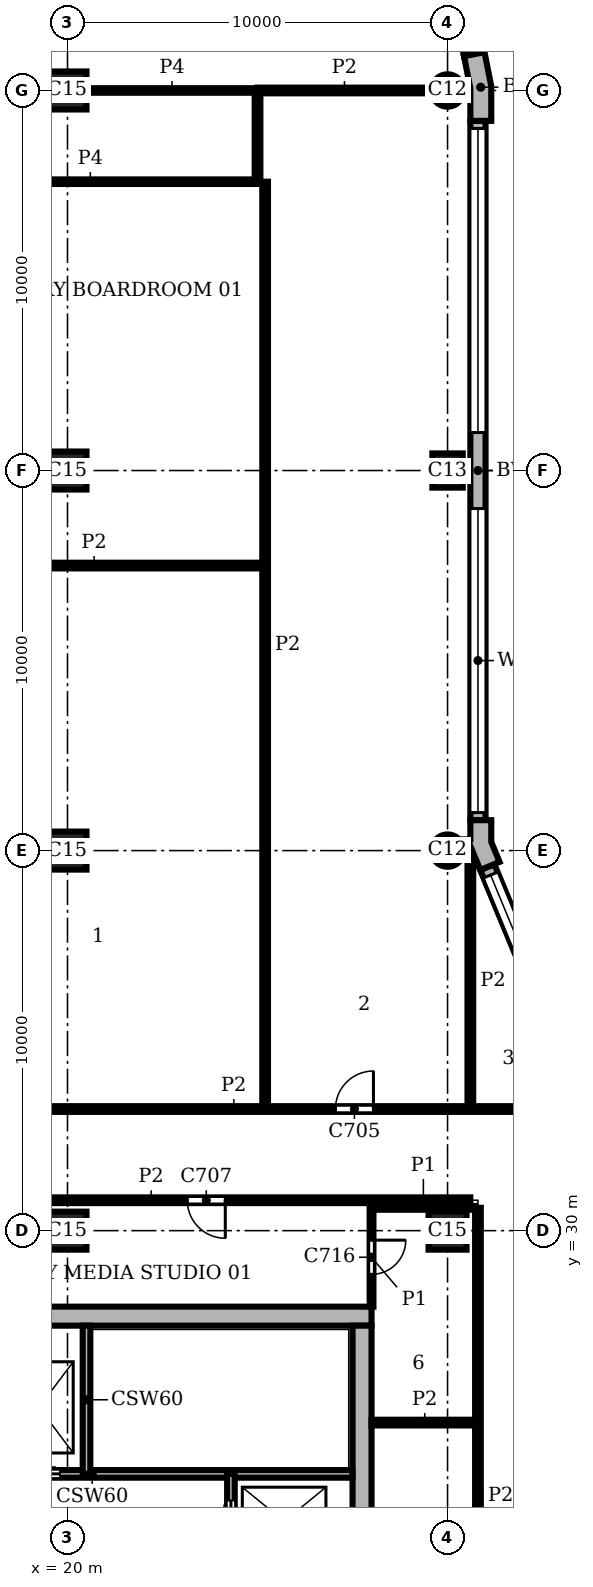
"""IFC4 building model, lengths in metres.
Left out: names, types, materials, properties, quantities, classifications, styles, units other than length and angle.
Written with IfcOpenShell. Run it as: python <this file> out.ifc"""

import sys

from ifc_helpers import new_model, si_unit, direction, frame, frame_2d, origin, origin_2d, place, context, subcontext, project, spatial, polyline, rectangle, circle, outline, extrude, element, fill, save


model = new_model("IFC4")
c1 = context("Model", 3, precision=1e-05, world=origin(), true_north=direction((0.0, 1.0)))
c2 = subcontext(c1, "Body", "Model", "MODEL_VIEW")
j1 = project(units=[si_unit("LENGTHUNIT", "METRE"), si_unit("PLANEANGLEUNIT", "RADIAN")], contexts=[c1])
p1 = place(None, origin())
s1 = spatial("IfcSite", under=j1, at=p1, CompositionType="ELEMENT")
p2 = place(p1, origin())
s2 = spatial("IfcBuilding", under=s1, at=p2, CompositionType="ELEMENT")
p3 = place(p2, frame((0.0, 0.0, 309.9)))
s3 = spatial("IfcBuildingStorey", under=s2, at=p3, CompositionType="ELEMENT", Elevation=309.9)
p4 = place(p3, frame((30.0, 40.0, 0.0), z_axis=(0.0, 0.0, 1.0), x_axis=(1.0, 0.0, 0.0)))
e1 = element("IfcColumn", 1, at=p4, inside=s3, PredefinedType="COLUMN", context=c2, shape_type="SweptSolid", body=[
    extrude(circle(Radius=0.425, at=origin_2d()), origin(), (0.0, 0.0, 1.0), 3.9),
])
p5 = place(p3, frame((30.0, 50.0, 0.0), z_axis=(0.0, 0.0, 1.0), x_axis=(0.0, 1.0, 0.0)))
e2 = element("IfcColumn", 2, at=p5, inside=s3, PredefinedType="COLUMN", context=c2, shape_type="SweptSolid", body=[
    extrude(rectangle(XDim=0.9, YDim=0.8, at=origin_2d()), origin(), (0.0, 0.0, 1.0), 3.9),
])
p6 = place(p3, frame((30.0, 60.0, 0.0), z_axis=(0.0, 0.0, 1.0), x_axis=(1.0, 0.0, 0.0)))
e3 = element("IfcColumn", 3, at=p6, inside=s3, PredefinedType="COLUMN", context=c2, shape_type="SweptSolid", body=[
    extrude(circle(Radius=0.425, at=origin_2d()), origin(), (0.0, 0.0, 1.0), 3.9),
])
for number, where, z_axis, x_axis in (
    (4, (20.0, 30.0, 0.0), (0.0, 0.0, 1.0), (1.0, 0.0, 0.0)),
    (5, (20.0, 40.0, 0.0), (0.0, 0.0, 1.0), (1.0, 0.0, 0.0)),
    (6, (20.0, 50.0, 0.0), (0.0, 0.0, 1.0), (1.0, 0.0, 0.0)),
    (7, (20.0, 60.0, 0.0), (0.0, 0.0, 1.0), (1.0, 0.0, 0.0)),
    (8, (30.0, 30.0, 0.0), (0.0, 0.0, 1.0), (1.0, 0.0, 0.0)),
):
    element("IfcColumn", number, at=place(p3, frame(where, z_axis=z_axis, x_axis=x_axis)), inside=s3, PredefinedType="COLUMN", context=c2, shape_type="SweptSolid", body=[
        extrude(rectangle(XDim=1.0, YDim=1.0, at=origin_2d()), origin(), (0.0, 0.0, 1.0), 3.9),
    ])
p7 = place(p3, frame((27.75, 8.5, 0.0), z_axis=(0.0, 0.0, 1.0), x_axis=(0.0, 1.0, 0.0)))
e9 = element("IfcWall", 9, at=p7, inside=s3, PredefinedType="SHEAR", context=c2, shape_type="SweptSolid", body=[
    extrude(rectangle(XDim=19.0, YDim=0.5, at=frame_2d((9.5, 0.0))), origin(), (0.0, 0.0, 1.0), 3.9),
])
p8 = place(p7, frame((4.95, 0.0, 0.0)))
e10 = element("IfcOpeningElement", 10, at=p8, cuts=e9, PredefinedType="OPENING", context=c2, shape_type="SweptSolid", body=[
    extrude(rectangle(XDim=1.6, YDim=2.1, at=frame_2d((0.8, 1.05))), frame((0.0, 0.26, 0.0), z_axis=(0.0, -1.0, 0.0), x_axis=(1.0, 0.0, 0.0)), (0.0, 0.0, 1.0), 0.52),
])
p9 = place(p3, frame((28.0, 27.75, 0.0), z_axis=(0.0, 0.0, 1.0), x_axis=(-1.0, 0.0, 0.0)))
e11 = element("IfcWall", 11, at=p9, inside=s3, PredefinedType="SHEAR", context=c2, shape_type="SweptSolid", body=[
    extrude(rectangle(XDim=20.0, YDim=0.5, at=frame_2d((10.0, 0.0))), origin(), (0.0, 0.0, 1.0), 3.9),
])
p10 = place(p3, origin())
e12 = element("IfcWall", 12, at=p10, inside=s3, PredefinedType="SOLIDWALL", context=c2, shape_type="SweptSolid", body=[
    extrude(outline(polyline([(30.62, 39.995), (30.62, 40.071), (30.861, 39.49), (31.23, 39.644), (31.369, 39.701), (31.15, 40.229), (31.15, 40.8), (31.0, 40.8), (30.6, 40.8), (30.6, 40.295), (30.425, 40.295), (30.425, 39.995), (30.62, 39.995)])), origin(), (0.0, 0.0, 1.0), 3.9),
])
e13 = element("IfcWall", 13, at=p10, inside=s3, PredefinedType="SOLIDWALL", context=c2, shape_type="SweptSolid", body=[
    extrude(outline(polyline([(31.0, 59.2), (31.15, 59.2), (31.15, 60.113), (30.972, 61.009), (30.825, 60.98), (30.432, 60.902), (30.6, 60.059), (30.6, 59.2), (31.0, 59.2)])), origin(), (0.0, 0.0, 1.0), 3.9),
])
p11 = place(p3, frame((33.362, 33.974, 0.0), z_axis=(0.0, 0.0, 1.0), x_axis=(-0.382655745237, 0.923891000409, 0.0)))
e14 = element("IfcWall", 14, at=p11, inside=s3, PredefinedType="SOLIDWALL", context=c2, shape_type="SweptSolid", body=[
    extrude(rectangle(XDim=6.053, YDim=0.4, at=frame_2d((3.027, 0.0))), origin(), (0.0, 0.0, 1.0), 3.9),
])
p12 = place(p11, frame((0.227, 0.0, 0.9)))
e15 = element("IfcOpeningElement", 15, at=p12, cuts=e14, PredefinedType="OPENING", context=c2, shape_type="SweptSolid", body=[
    extrude(rectangle(XDim=5.6, YDim=2.35, at=frame_2d((2.8, 1.175))), frame((0.0, 0.21, 0.0), z_axis=(0.0, -1.0, 0.0), x_axis=(1.0, 0.0, 0.0)), (0.0, 0.0, 1.0), 0.42),
])
p13 = place(p3, frame((30.8, 40.8, 0.0), z_axis=(0.0, 0.0, 1.0), x_axis=(0.0, 1.0, 0.0)))
e16 = element("IfcWall", 16, at=p13, inside=s3, PredefinedType="SOLIDWALL", context=c2, shape_type="SweptSolid", body=[
    extrude(rectangle(XDim=18.4, YDim=0.4, at=frame_2d((9.2, 0.0))), origin(), (0.0, 0.0, 1.0), 3.9),
])
p14 = place(p13, frame((0.2, 0.0, 0.9)))
e17 = element("IfcOpeningElement", 17, at=p14, cuts=e16, PredefinedType="OPENING", context=c2, shape_type="SweptSolid", body=[
    extrude(rectangle(XDim=8.0, YDim=2.35, at=frame_2d((4.0, 1.175))), frame((0.0, 0.21, 0.0), z_axis=(0.0, -1.0, 0.0), x_axis=(1.0, 0.0, 0.0)), (0.0, 0.0, 1.0), 0.42),
])
p15 = place(p13, frame((10.2, 0.0, 0.9)))
e18 = element("IfcOpeningElement", 18, at=p15, cuts=e16, PredefinedType="OPENING", context=c2, shape_type="SweptSolid", body=[
    extrude(rectangle(XDim=8.0, YDim=2.35, at=frame_2d((4.0, 1.175))), frame((0.0, 0.21, 0.0), z_axis=(0.0, -1.0, 0.0), x_axis=(1.0, 0.0, 0.0)), (0.0, 0.0, 1.0), 0.42),
])
p16 = place(p3, frame((30.629, 60.941, 0.0), z_axis=(0.0, 0.0, 1.0), x_axis=(-0.195098533057, 0.98078364709, 0.0)))
e19 = element("IfcWall", 19, at=p16, inside=s3, PredefinedType="SOLIDWALL", context=c2, shape_type="SweptSolid", body=[
    extrude(rectangle(XDim=4.753, YDim=0.4, at=frame_2d((2.376, 0.0))), origin(), (0.0, 0.0, 1.0), 3.9),
])
p17 = place(p16, frame((0.226, 0.0, 0.9)))
e20 = element("IfcOpeningElement", 20, at=p17, cuts=e19, PredefinedType="OPENING", context=c2, shape_type="SweptSolid", body=[
    extrude(rectangle(XDim=4.3, YDim=2.35, at=frame_2d((2.15, 1.175))), frame((0.0, 0.21, 0.0), z_axis=(0.0, -1.0, 0.0), x_axis=(1.0, 0.0, 0.0)), (0.0, 0.0, 1.0), 0.42),
])
p18 = place(p3, frame((13.8, 23.6, 0.0), z_axis=(0.0, 0.0, 1.0), x_axis=(1.0, 0.0, 0.0)))
e21 = element("IfcWall", 21, at=p18, inside=s3, PredefinedType="SHEAR", context=c2, shape_type="SweptSolid", body=[
    extrude(rectangle(XDim=13.7, YDim=0.2, at=frame_2d((6.85, 0.0))), origin(), (0.0, 0.0, 1.0), 3.58),
])
p19 = place(p18, frame((2.4, 0.0, 0.0)))
e22 = element("IfcOpeningElement", 22, at=p19, cuts=e21, PredefinedType="OPENING", context=c2, shape_type="SweptSolid", body=[
    extrude(rectangle(XDim=1.1, YDim=2.1, at=frame_2d((0.55, 1.05))), frame((0.0, 0.11, 0.0), z_axis=(0.0, -1.0, 0.0), x_axis=(1.0, 0.0, 0.0)), (0.0, 0.0, 1.0), 0.22),
])
p20 = place(p18, frame((4.9, 0.0, 0.0)))
e23 = element("IfcOpeningElement", 23, at=p20, cuts=e21, PredefinedType="OPENING", context=c2, shape_type="SweptSolid", body=[
    extrude(rectangle(XDim=1.1, YDim=2.1, at=frame_2d((0.55, 1.05))), frame((0.0, 0.11, 0.0), z_axis=(0.0, -1.0, 0.0), x_axis=(1.0, 0.0, 0.0)), (0.0, 0.0, 1.0), 0.22),
])
p21 = place(p18, frame((0.15, 0.0, 0.0)))
e24 = element("IfcOpeningElement", 24, at=p21, cuts=e21, PredefinedType="OPENING", context=c2, shape_type="SweptSolid", body=[
    extrude(rectangle(XDim=1.0, YDim=2.1, at=frame_2d((0.5, 1.05))), frame((0.0, 0.11, 0.0), z_axis=(0.0, -1.0, 0.0), x_axis=(1.0, 0.0, 0.0)), (0.0, 0.0, 1.0), 0.22),
])
p22 = place(p3, frame((20.5, 23.6, 0.0), z_axis=(0.0, 0.0, 1.0), x_axis=(0.0, 1.0, 0.0)))
e25 = element("IfcWall", 25, at=p22, inside=s3, PredefinedType="SHEAR", context=c2, shape_type="SweptSolid", body=[
    extrude(rectangle(XDim=3.9, YDim=0.2, at=frame_2d((1.95, 0.0))), origin(), (0.0, 0.0, 1.0), 3.58),
])
p23 = place(p3, frame((24.3, 16.1, 0.0), z_axis=(0.0, 0.0, 1.0), x_axis=(0.0, 1.0, 0.0)))
e26 = element("IfcWall", 26, at=p23, inside=s3, PredefinedType="SHEAR", context=c2, shape_type="SweptSolid", body=[
    extrude(rectangle(XDim=7.5, YDim=0.2, at=frame_2d((3.75, 0.0))), origin(), (0.0, 0.0, 1.0), 3.58),
])
p24 = place(p23, frame((5.7, 0.0, 0.0)))
e27 = element("IfcOpeningElement", 27, at=p24, cuts=e26, PredefinedType="OPENING", context=c2, shape_type="SweptSolid", body=[
    extrude(rectangle(XDim=1.1, YDim=2.1, at=frame_2d((0.55, 1.05))), frame((0.0, 0.11, 0.0), z_axis=(0.0, -1.0, 0.0), x_axis=(1.0, 0.0, 0.0)), (0.0, 0.0, 1.0), 0.22),
])
p25 = place(p3, frame((28.0, 28.0, 0.0), z_axis=(0.0, 0.0, 1.0), x_axis=(0.0, 1.0, 0.0)))
e28 = element("IfcWall", 28, at=p25, inside=s3, PredefinedType="PARTITIONING", context=c2, shape_type="SweptSolid", body=[
    extrude(rectangle(XDim=2.598, YDim=0.1, at=frame_2d((1.299, 0.0))), origin(), (0.0, 0.0, 1.0), 3.58),
])
p26 = place(p25, frame((0.85, 0.0, 0.0)))
e29 = element("IfcOpeningElement", 29, at=p26, cuts=e28, PredefinedType="OPENING", context=c2, shape_type="SweptSolid", body=[
    extrude(rectangle(XDim=0.9, YDim=2.1, at=frame_2d((0.45, 1.05))), frame((0.0, 0.06, 0.0), z_axis=(0.0, -1.0, 0.0), x_axis=(1.0, 0.0, 0.0)), (0.0, 0.0, 1.0), 0.12),
])
p27 = place(p3, frame((28.002, 30.6, 0.0), z_axis=(0.0, 0.0, 1.0), x_axis=(1.0, 0.0, 0.0)))
e30 = element("IfcWall", 30, at=p27, inside=s3, PredefinedType="PARTITIONING", context=c2, shape_type="SweptSolid", body=[
    extrude(rectangle(XDim=2.723, YDim=0.1, at=frame_2d((1.362, 0.0))), origin(), (0.0, 0.0, 1.0), 3.58),
])
p28 = place(p3, frame((25.0, 57.6, 0.0), z_axis=(0.0, 0.0, 1.0), x_axis=(0.0, 1.0, 0.0)))
e31 = element("IfcWall", 31, at=p28, inside=s3, PredefinedType="PARTITIONING", context=c2, shape_type="SweptSolid", body=[
    extrude(rectangle(XDim=2.4, YDim=0.15, at=frame_2d((1.2, 0.0))), origin(), (0.0, 0.0, 1.0), 3.58),
])
p29 = place(p3, frame((25.2, 33.2, 0.0), z_axis=(0.0, 0.0, 1.0), x_axis=(0.0, 1.0, 0.0)))
e32 = element("IfcWall", 32, at=p29, inside=s3, PredefinedType="PARTITIONING", context=c2, shape_type="SweptSolid", body=[
    extrude(rectangle(XDim=24.4, YDim=0.15, at=frame_2d((12.2, 0.0))), origin(), (0.0, 0.0, 1.0), 3.58),
])
p30 = place(p3, frame((30.6, 33.2, 0.0), z_axis=(0.0, 0.0, 1.0), x_axis=(0.0, 1.0, 0.0)))
e33 = element("IfcWall", 33, at=p30, inside=s3, PredefinedType="PARTITIONING", context=c2, shape_type="SweptSolid", body=[
    extrude(rectangle(XDim=6.738, YDim=0.15, at=frame_2d((3.369, 0.0))), origin(), (0.0, 0.0, 1.0), 3.58),
])
p31 = place(p3, frame((30.8, 15.45, 0.0), z_axis=(0.0, 0.0, 1.0), x_axis=(0.0, 1.0, 0.0)))
e34 = element("IfcWall", 34, at=p31, inside=s3, PredefinedType="PARTITIONING", context=c2, shape_type="SweptSolid", body=[
    extrude(rectangle(XDim=15.15, YDim=0.15, at=frame_2d((7.575, 0.0))), origin(), (0.0, 0.0, 1.0), 3.58),
])
p32 = place(p31, frame((5.35, 0.0, 0.0)))
e35 = element("IfcOpeningElement", 35, at=p32, cuts=e34, PredefinedType="OPENING", context=c2, shape_type="SweptSolid", body=[
    extrude(rectangle(XDim=1.0, YDim=2.1, at=frame_2d((0.5, 1.05))), frame((0.0, 0.085, 0.0), z_axis=(0.0, -1.0, 0.0), x_axis=(1.0, 0.0, 0.0)), (0.0, 0.0, 1.0), 0.17),
])
p33 = place(p3, frame((28.0, 24.95, 0.0), z_axis=(0.0, 0.0, 1.0), x_axis=(1.0, 0.0, 0.0)))
e36 = element("IfcWall", 36, at=p33, inside=s3, PredefinedType="PARTITIONING", context=c2, shape_type="SweptSolid", body=[
    extrude(rectangle(XDim=2.8, YDim=0.15, at=frame_2d((1.4, 0.0))), origin(), (0.0, 0.0, 1.0), 3.58),
])
p34 = place(p3, frame((13.802, 30.8, 0.0), z_axis=(0.0, 0.0, 1.0), x_axis=(1.0, 0.0, 0.0)))
e37 = element("IfcWall", 37, at=p34, inside=s3, PredefinedType="PARTITIONING", context=c2, shape_type="SweptSolid", body=[
    extrude(rectangle(XDim=16.797, YDim=0.15, at=frame_2d((8.398, 0.0))), origin(), (0.0, 0.0, 1.0), 3.58),
])
p35 = place(p34, frame((9.35, 0.0, 0.0)))
e38 = element("IfcOpeningElement", 38, at=p35, cuts=e37, PredefinedType="OPENING", context=c2, shape_type="SweptSolid", body=[
    extrude(rectangle(XDim=1.0, YDim=2.1, at=frame_2d((0.5, 1.05))), frame((0.0, 0.085, 0.0), z_axis=(0.0, -1.0, 0.0), x_axis=(1.0, 0.0, 0.0)), (0.0, 0.0, 1.0), 0.17),
])
p36 = place(p3, frame((16.2, 33.2, 0.0), z_axis=(0.0, 0.0, 1.0), x_axis=(1.0, 0.0, 0.0)))
e39 = element("IfcWall", 39, at=p36, inside=s3, PredefinedType="PARTITIONING", context=c2, shape_type="SweptSolid", body=[
    extrude(rectangle(XDim=16.352, YDim=0.15, at=frame_2d((8.176, 0.0))), origin(), (0.0, 0.0, 1.0), 3.58),
])
p37 = place(p36, frame((10.85, 0.0, 0.0)))
e40 = element("IfcOpeningElement", 40, at=p37, cuts=e39, PredefinedType="OPENING", context=c2, shape_type="SweptSolid", body=[
    extrude(rectangle(XDim=1.0, YDim=2.1, at=frame_2d((0.5, 1.05))), frame((0.0, 0.085, 0.0), z_axis=(0.0, -1.0, 0.0), x_axis=(1.0, 0.0, 0.0)), (0.0, 0.0, 1.0), 0.17),
])
p38 = place(p3, frame((16.2, 47.5, 0.0), z_axis=(0.0, 0.0, 1.0), x_axis=(1.0, 0.0, 0.0)))
e41 = element("IfcWall", 41, at=p38, inside=s3, PredefinedType="PARTITIONING", context=c2, shape_type="SweptSolid", body=[
    extrude(rectangle(XDim=9.0, YDim=0.15, at=frame_2d((4.5, 0.0))), origin(), (0.0, 0.0, 1.0), 3.58),
])
p39 = place(p3, frame((25.0, 60.0, 0.0), z_axis=(0.0, 0.0, 1.0), x_axis=(1.0, 0.0, 0.0)))
e42 = element("IfcWall", 42, at=p39, inside=s3, PredefinedType="PARTITIONING", context=c2, shape_type="SweptSolid", body=[
    extrude(rectangle(XDim=4.575, YDim=0.15, at=frame_2d((2.288, 0.0))), origin(), (0.0, 0.0, 1.0), 3.58),
])
p40 = place(p3, frame((16.2, 57.6, 0.0), z_axis=(0.0, 0.0, 1.0), x_axis=(1.0, 0.0, 0.0)))
e43 = element("IfcWall", 43, at=p40, inside=s3, PredefinedType="PARTITIONING", context=c2, shape_type="SweptSolid", body=[
    extrude(rectangle(XDim=8.8, YDim=0.12, at=frame_2d((4.4, 0.0))), origin(), (0.0, 0.0, 1.0), 3.58),
])
p41 = place(p3, frame((20.5, 60.0, 0.0), z_axis=(0.0, 0.0, 1.0), x_axis=(1.0, 0.0, 0.0)))
e44 = element("IfcWall", 44, at=p41, inside=s3, PredefinedType="PARTITIONING", context=c2, shape_type="SweptSolid", body=[
    extrude(rectangle(XDim=4.5, YDim=0.12, at=frame_2d((2.25, 0.0))), origin(), (0.0, 0.0, 1.0), 3.58),
])
p42 = place(p12, origin())
e45 = element("IfcWindow", 45, at=p42, inside=s3, PartitioningType="SINGLE_PANEL", PredefinedType="WINDOW", context=c2, shape_type="SweptSolid", body=[
    extrude(rectangle(XDim=5.6, YDim=2.35, at=frame_2d((2.8, 1.175))), frame((0.0, 0.16, 0.0), z_axis=(0.0, -1.0, 0.0), x_axis=(1.0, 0.0, 0.0)), (0.0, 0.0, 1.0), 0.06),
])
fill(e15, e45)
p43 = place(p14, origin())
e46 = element("IfcWindow", 46, at=p43, inside=s3, PartitioningType="SINGLE_PANEL", PredefinedType="WINDOW", context=c2, shape_type="SweptSolid", body=[
    extrude(rectangle(XDim=8.0, YDim=2.35, at=frame_2d((4.0, 1.175))), frame((0.0, 0.16, 0.0), z_axis=(0.0, -1.0, 0.0), x_axis=(1.0, 0.0, 0.0)), (0.0, 0.0, 1.0), 0.06),
])
fill(e17, e46)
p44 = place(p15, origin())
e47 = element("IfcWindow", 47, at=p44, inside=s3, PartitioningType="SINGLE_PANEL", PredefinedType="WINDOW", context=c2, shape_type="SweptSolid", body=[
    extrude(rectangle(XDim=8.0, YDim=2.35, at=frame_2d((4.0, 1.175))), frame((0.0, 0.16, 0.0), z_axis=(0.0, -1.0, 0.0), x_axis=(1.0, 0.0, 0.0)), (0.0, 0.0, 1.0), 0.06),
])
fill(e18, e47)
p45 = place(p24, origin())
e48 = element("IfcDoor", 48, at=p45, inside=s3, OperationType="DOUBLE_DOOR_SLIDING", PredefinedType="DOOR", context=c2, shape_type="SweptSolid", body=[
    extrude(rectangle(XDim=1.1, YDim=2.1, at=frame_2d((0.55, 1.05))), frame((0.0, 0.025, 0.0), z_axis=(0.0, -1.0, 0.0), x_axis=(1.0, 0.0, 0.0)), (0.0, 0.0, 1.0), 0.05),
])
fill(e27, e48)
p46 = place(p20, origin())
e49 = element("IfcDoor", 49, at=p46, inside=s3, OperationType="DOUBLE_DOOR_SLIDING", PredefinedType="DOOR", context=c2, shape_type="SweptSolid", body=[
    extrude(rectangle(XDim=1.1, YDim=2.1, at=frame_2d((0.55, 1.05))), frame((0.0, 0.025, 0.0), z_axis=(0.0, -1.0, 0.0), x_axis=(1.0, 0.0, 0.0)), (0.0, 0.0, 1.0), 0.05),
])
fill(e23, e49)
p47 = place(p37, origin())
e50 = element("IfcDoor", 50, at=p47, inside=s3, OperationType="SINGLE_SWING_RIGHT", PredefinedType="DOOR", context=c2, shape_type="SweptSolid", body=[
    extrude(rectangle(XDim=1.0, YDim=2.1, at=frame_2d((0.5, 1.05))), frame((0.0, 0.025, 0.0), z_axis=(0.0, -1.0, 0.0), x_axis=(1.0, 0.0, 0.0)), (0.0, 0.0, 1.0), 0.05),
])
fill(e40, e50)
p48 = place(p35, frame((1.0, 0.0, 0.0), z_axis=(0.0, 0.0, 1.0), x_axis=(-1.0, 0.0, 0.0)))
e51 = element("IfcDoor", 51, at=p48, inside=s3, OperationType="SINGLE_SWING_LEFT", PredefinedType="DOOR", context=c2, shape_type="SweptSolid", body=[
    extrude(rectangle(XDim=1.0, YDim=2.1, at=frame_2d((0.5, 1.05))), frame((0.0, 0.025, 0.0), z_axis=(0.0, -1.0, 0.0), x_axis=(1.0, 0.0, 0.0)), (0.0, 0.0, 1.0), 0.05),
])
fill(e38, e51)
p49 = place(p26, frame((0.9, 0.0, 0.0), z_axis=(0.0, 0.0, 1.0), x_axis=(-1.0, 0.0, 0.0)))
e52 = element("IfcDoor", 52, at=p49, inside=s3, OperationType="SINGLE_SWING_LEFT", PredefinedType="DOOR", context=c2, shape_type="SweptSolid", body=[
    extrude(rectangle(XDim=0.9, YDim=2.1, at=frame_2d((0.45, 1.05))), frame((0.0, 0.025, 0.0), z_axis=(0.0, -1.0, 0.0), x_axis=(1.0, 0.0, 0.0)), (0.0, 0.0, 1.0), 0.05),
])
fill(e29, e52)
save(model, sys.argv[1])
